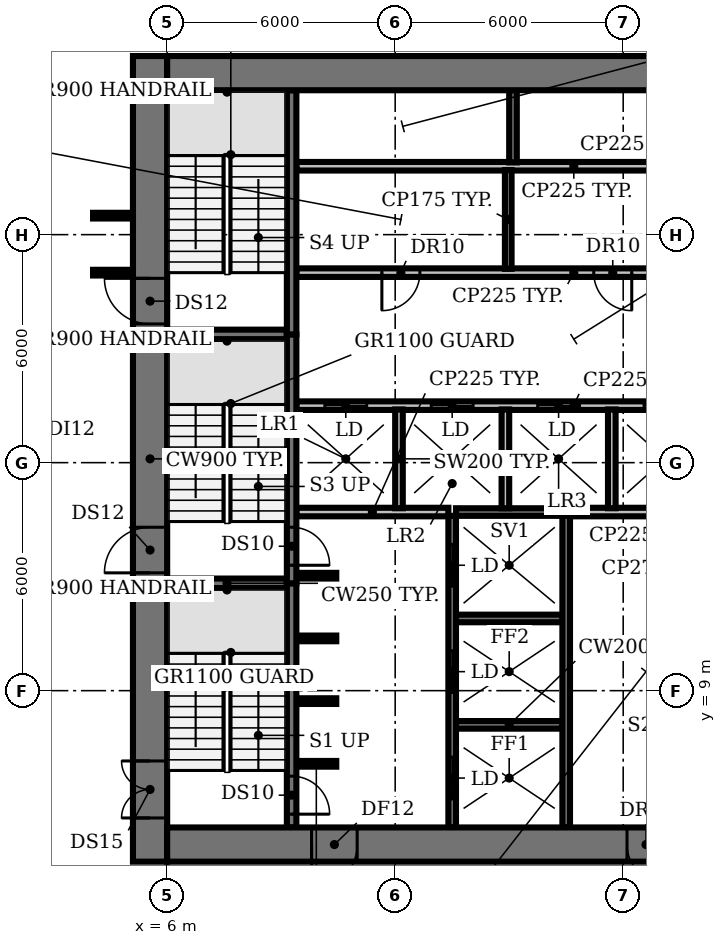
"""IFC4 building model, lengths in metres.
Left out: names, types, materials, properties, quantities, classifications, styles, units other than length and angle.
Written with IfcOpenShell. Run it as: python <this file> out.ifc"""

import sys

from ifc_helpers import new_model, si_unit, direction, frame, frame_2d, origin, place, context, subcontext, project, spatial, rectangle, extrude, element, fill, save


model = new_model("IFC4")
c1 = context("Model", 3, precision=1e-05, world=origin(), true_north=direction((0.0, 1.0)))
c2 = subcontext(c1, "Body", "Model", "MODEL_VIEW")
j1 = project(units=[si_unit("LENGTHUNIT", "METRE"), si_unit("PLANEANGLEUNIT", "RADIAN")], contexts=[c1])
p1 = place(None, origin())
s1 = spatial("IfcSite", under=j1, at=p1, CompositionType="ELEMENT")
p2 = place(p1, origin())
s2 = spatial("IfcBuilding", under=s1, at=p2, CompositionType="ELEMENT")
p3 = place(p2, frame((0.0, 0.0, 75.2)))
s3 = spatial("IfcBuildingStorey", under=s2, at=p3, CompositionType="ELEMENT", Elevation=75.2)
p4 = place(p3, frame((9.4, 7.075, 0.0), z_axis=(0.0, 0.0, 1.0), x_axis=(1.0, 0.0, 0.0)))
e1 = element("IfcWall", 1, at=p4, inside=s3, PredefinedType="SHEAR", context=c2, shape_type="SweptSolid", body=[
    extrude(rectangle(XDim=1.05, YDim=0.15, at=frame_2d((0.525, 0.0))), origin(), (0.0, 0.0, 1.0), 3.8),
])
p5 = place(p3, frame((13.6, 8.1, 0.0), z_axis=(0.0, 0.0, 1.0), x_axis=(1.0, 0.0, 0.0)))
e2 = element("IfcWall", 2, at=p5, inside=s3, PredefinedType="SHEAR", context=c2, shape_type="SweptSolid", body=[
    extrude(rectangle(XDim=2.8, YDim=0.2, at=frame_2d((1.4, 0.0))), origin(), (0.0, 0.0, 1.0), 3.8),
])
for number, where, z_axis, x_axis in (
    (3, (9.4, 8.725, 0.0), (0.0, 0.0, 1.0), (1.0, 0.0, 0.0)),
    (4, (9.4, 10.375, 0.0), (0.0, 0.0, 1.0), (1.0, 0.0, 0.0)),
):
    element("IfcWall", number, at=place(p3, frame(where, z_axis=z_axis, x_axis=x_axis)), inside=s3, PredefinedType="SHEAR", context=c2, shape_type="SweptSolid", body=[
        extrude(rectangle(XDim=1.05, YDim=0.15, at=frame_2d((0.525, 0.0))), origin(), (0.0, 0.0, 1.0), 3.8),
    ])
p6 = place(p3, frame((13.6, 10.9, 0.0), z_axis=(0.0, 0.0, 1.0), x_axis=(1.0, 0.0, 0.0)))
e5 = element("IfcWall", 5, at=p6, inside=s3, PredefinedType="SHEAR", context=c2, shape_type="SweptSolid", body=[
    extrude(rectangle(XDim=2.8, YDim=0.2, at=frame_2d((1.4, 0.0))), origin(), (0.0, 0.0, 1.0), 3.8),
])
p7 = place(p3, frame((6.0, 11.825, 0.0), z_axis=(0.0, 0.0, 1.0), x_axis=(1.0, 0.0, 0.0)))
e6 = element("IfcWall", 6, at=p7, inside=s3, PredefinedType="SHEAR", context=c2, shape_type="SweptSolid", body=[
    extrude(rectangle(XDim=3.15, YDim=0.25, at=frame_2d((1.575, 0.0))), origin(), (0.0, 0.0, 1.0), 3.8),
])
p8 = place(p3, frame((9.4, 12.025, 0.0), z_axis=(0.0, 0.0, 1.0), x_axis=(1.0, 0.0, 0.0)))
e7 = element("IfcWall", 7, at=p8, inside=s3, PredefinedType="SHEAR", context=c2, shape_type="SweptSolid", body=[
    extrude(rectangle(XDim=1.05, YDim=0.15, at=frame_2d((0.525, 0.0))), origin(), (0.0, 0.0, 1.0), 3.8),
])
p9 = place(p3, frame((9.4, 13.7, 0.0), z_axis=(0.0, 0.0, 1.0), x_axis=(1.0, 0.0, 0.0)))
e8 = element("IfcWall", 8, at=p9, inside=s3, PredefinedType="PARTITIONING", context=c2, shape_type="SweptSolid", body=[
    extrude(rectangle(XDim=4.0, YDim=0.225, at=frame_2d((2.0, 0.0))), origin(), (0.0, 0.0, 1.0), 3.8),
])
p10 = place(p3, frame((13.6, 13.7, 0.0), z_axis=(0.0, 0.0, 1.0), x_axis=(1.0, 0.0, 0.0)))
e9 = element("IfcWall", 9, at=p10, inside=s3, PredefinedType="SHEAR", context=c2, shape_type="SweptSolid", body=[
    extrude(rectangle(XDim=2.8, YDim=0.2, at=frame_2d((1.4, 0.0))), origin(), (0.0, 0.0, 1.0), 3.8),
])
p11 = place(p3, frame((16.6, 13.7, 0.0), z_axis=(0.0, 0.0, 1.0), x_axis=(1.0, 0.0, 0.0)))
e10 = element("IfcWall", 10, at=p11, inside=s3, PredefinedType="PARTITIONING", context=c2, shape_type="SweptSolid", body=[
    extrude(rectangle(XDim=7.4, YDim=0.225, at=frame_2d((3.7, 0.0))), origin(), (0.0, 0.0, 1.0), 3.8),
])
p12 = place(p3, frame((9.4, 16.5, 0.0), z_axis=(0.0, 0.0, 1.0), x_axis=(1.0, 0.0, 0.0)))
e11 = element("IfcWall", 11, at=p12, inside=s3, PredefinedType="PARTITIONING", context=c2, shape_type="SweptSolid", body=[
    extrude(rectangle(XDim=14.6, YDim=0.225, at=frame_2d((7.3, 0.0))), origin(), (0.0, 0.0, 1.0), 3.8),
])
p13 = place(p12, frame((0.75, 0.0, 0.0)))
e12 = element("IfcOpeningElement", 12, at=p13, cuts=e11, PredefinedType="OPENING", context=c2, shape_type="SweptSolid", body=[
    extrude(rectangle(XDim=1.1, YDim=2.1, at=frame_2d((0.55, 1.05))), frame((0.0, 0.123, 0.0), z_axis=(0.0, -1.0, 0.0), x_axis=(1.0, 0.0, 0.0)), (0.0, 0.0, 1.0), 0.245),
])
p14 = place(p12, frame((3.55, 0.0, 0.0)))
e13 = element("IfcOpeningElement", 13, at=p14, cuts=e11, PredefinedType="OPENING", context=c2, shape_type="SweptSolid", body=[
    extrude(rectangle(XDim=1.1, YDim=2.1, at=frame_2d((0.55, 1.05))), frame((0.0, 0.123, 0.0), z_axis=(0.0, -1.0, 0.0), x_axis=(1.0, 0.0, 0.0)), (0.0, 0.0, 1.0), 0.245),
])
p15 = place(p12, frame((6.35, 0.0, 0.0)))
e14 = element("IfcOpeningElement", 14, at=p15, cuts=e11, PredefinedType="OPENING", context=c2, shape_type="SweptSolid", body=[
    extrude(rectangle(XDim=1.1, YDim=2.1, at=frame_2d((0.55, 1.05))), frame((0.0, 0.123, 0.0), z_axis=(0.0, -1.0, 0.0), x_axis=(1.0, 0.0, 0.0)), (0.0, 0.0, 1.0), 0.245),
])
p16 = place(p12, frame((9.15, 0.0, 0.0)))
e15 = element("IfcOpeningElement", 15, at=p16, cuts=e11, PredefinedType="OPENING", context=c2, shape_type="SweptSolid", body=[
    extrude(rectangle(XDim=1.1, YDim=2.1, at=frame_2d((0.55, 1.05))), frame((0.0, 0.123, 0.0), z_axis=(0.0, -1.0, 0.0), x_axis=(1.0, 0.0, 0.0)), (0.0, 0.0, 1.0), 0.245),
])
p17 = place(p12, frame((11.308, 0.0, 0.0)))
e16 = element("IfcOpeningElement", 16, at=p17, cuts=e11, PredefinedType="OPENING", context=c2, shape_type="SweptSolid", body=[
    extrude(rectangle(XDim=0.9, YDim=2.1, at=frame_2d((0.45, 1.05))), frame((0.0, 0.123, 0.0), z_axis=(0.0, -1.0, 0.0), x_axis=(1.0, 0.0, 0.0)), (0.0, 0.0, 1.0), 0.245),
])
p18 = place(p12, frame((13.083, 0.0, 0.0)))
e17 = element("IfcOpeningElement", 17, at=p18, cuts=e11, PredefinedType="OPENING", context=c2, shape_type="SweptSolid", body=[
    extrude(rectangle(XDim=0.9, YDim=2.1, at=frame_2d((0.45, 1.05))), frame((0.0, 0.123, 0.0), z_axis=(0.0, -1.0, 0.0), x_axis=(1.0, 0.0, 0.0)), (0.0, 0.0, 1.0), 0.245),
])
p19 = place(p3, frame((6.0, 18.375, 0.0), z_axis=(0.0, 0.0, 1.0), x_axis=(1.0, 0.0, 0.0)))
e18 = element("IfcWall", 18, at=p19, inside=s3, PredefinedType="SHEAR", context=c2, shape_type="SweptSolid", body=[
    extrude(rectangle(XDim=3.15, YDim=0.25, at=frame_2d((1.575, 0.0))), origin(), (0.0, 0.0, 1.0), 3.8),
])
p20 = place(p3, frame((24.0, 20.0, 0.0), z_axis=(0.0, 0.0, 1.0), x_axis=(-1.0, 0.0, 0.0)))
e19 = element("IfcWall", 19, at=p20, inside=s3, PredefinedType="PARTITIONING", context=c2, shape_type="SweptSolid", body=[
    extrude(rectangle(XDim=14.6, YDim=0.225, at=frame_2d((7.3, 0.0))), origin(), (0.0, 0.0, 1.0), 3.8),
])
p21 = place(p20, frame((11.35, 0.0, 0.0)))
e20 = element("IfcOpeningElement", 20, at=p21, cuts=e19, PredefinedType="OPENING", context=c2, shape_type="SweptSolid", body=[
    extrude(rectangle(XDim=1.0, YDim=2.1, at=frame_2d((0.5, 1.05))), frame((0.0, 0.123, 0.0), z_axis=(0.0, -1.0, 0.0), x_axis=(1.0, 0.0, 0.0)), (0.0, 0.0, 1.0), 0.245),
])
p22 = place(p20, frame((5.775, 0.0, 0.0)))
e21 = element("IfcOpeningElement", 21, at=p22, cuts=e19, PredefinedType="OPENING", context=c2, shape_type="SweptSolid", body=[
    extrude(rectangle(XDim=1.0, YDim=2.1, at=frame_2d((0.5, 1.05))), frame((0.0, 0.123, 0.0), z_axis=(0.0, -1.0, 0.0), x_axis=(1.0, 0.0, 0.0)), (0.0, 0.0, 1.0), 0.245),
])
p23 = place(p20, frame((2.308, 0.0, 0.0)))
e22 = element("IfcOpeningElement", 22, at=p23, cuts=e19, PredefinedType="OPENING", context=c2, shape_type="SweptSolid", body=[
    extrude(rectangle(XDim=0.9, YDim=2.1, at=frame_2d((0.45, 1.05))), frame((0.0, 0.123, 0.0), z_axis=(0.0, -1.0, 0.0), x_axis=(1.0, 0.0, 0.0)), (0.0, 0.0, 1.0), 0.245),
])
p24 = place(p20, frame((0.532, 0.0, 0.0)))
e23 = element("IfcOpeningElement", 23, at=p24, cuts=e19, PredefinedType="OPENING", context=c2, shape_type="SweptSolid", body=[
    extrude(rectangle(XDim=0.9, YDim=2.1, at=frame_2d((0.45, 1.05))), frame((0.0, 0.123, 0.0), z_axis=(0.0, -1.0, 0.0), x_axis=(1.0, 0.0, 0.0)), (0.0, 0.0, 1.0), 0.245),
])
p25 = place(p3, frame((9.4, 22.8, 0.0), z_axis=(0.0, 0.0, 1.0), x_axis=(1.0, 0.0, 0.0)))
e24 = element("IfcWall", 24, at=p25, inside=s3, PredefinedType="PARTITIONING", context=c2, shape_type="SweptSolid", body=[
    extrude(rectangle(XDim=14.6, YDim=0.225, at=frame_2d((7.3, 0.0))), origin(), (0.0, 0.0, 1.0), 3.8),
])
p26 = place(p3, frame((9.275, 11.825, 0.0), z_axis=(0.0, 0.0, 1.0), x_axis=(0.0, -1.0, 0.0)))
e25 = element("IfcWall", 25, at=p26, inside=s3, PredefinedType="SHEAR", context=c2, shape_type="SweptSolid", body=[
    extrude(rectangle(XDim=6.425, YDim=0.25, at=frame_2d((3.212, 0.0))), origin(), (0.0, 0.0, 1.0), 3.8),
])
p27 = place(p26, frame((5.075, 0.0, 0.0)))
e26 = element("IfcOpeningElement", 26, at=p27, cuts=e25, PredefinedType="OPENING", context=c2, shape_type="SweptSolid", body=[
    extrude(rectangle(XDim=1.0, YDim=2.1, at=frame_2d((0.5, 1.05))), frame((0.0, 0.135, 0.0), z_axis=(0.0, -1.0, 0.0), x_axis=(1.0, 0.0, 0.0)), (0.0, 0.0, 1.0), 0.27),
])
p28 = place(p3, frame((9.275, 18.375, 0.0), z_axis=(0.0, 0.0, 1.0), x_axis=(0.0, -1.0, 0.0)))
e27 = element("IfcWall", 27, at=p28, inside=s3, PredefinedType="SHEAR", context=c2, shape_type="SweptSolid", body=[
    extrude(rectangle(XDim=6.55, YDim=0.25, at=frame_2d((3.275, 0.0))), origin(), (0.0, 0.0, 1.0), 3.8),
])
p29 = place(p28, frame((5.075, 0.0, 0.0)))
e28 = element("IfcOpeningElement", 28, at=p29, cuts=e27, PredefinedType="OPENING", context=c2, shape_type="SweptSolid", body=[
    extrude(rectangle(XDim=1.0, YDim=2.1, at=frame_2d((0.5, 1.05))), frame((0.0, 0.135, 0.0), z_axis=(0.0, -1.0, 0.0), x_axis=(1.0, 0.0, 0.0)), (0.0, 0.0, 1.0), 0.27),
])
p30 = place(p3, frame((9.275, 18.375, 0.0), z_axis=(0.0, 0.0, 1.0), x_axis=(0.0, 1.0, 0.0)))
e29 = element("IfcWall", 29, at=p30, inside=s3, PredefinedType="SHEAR", context=c2, shape_type="SweptSolid", body=[
    extrude(rectangle(XDim=6.425, YDim=0.25, at=frame_2d((3.212, 0.0))), origin(), (0.0, 0.0, 1.0), 3.8),
])
p31 = place(p3, frame((12.1, 13.8, 0.0), z_axis=(0.0, 0.0, 1.0), x_axis=(0.0, 1.0, 0.0)))
e30 = element("IfcWall", 30, at=p31, inside=s3, PredefinedType="SOLIDWALL", context=c2, shape_type="SweptSolid", body=[
    extrude(rectangle(XDim=2.6, YDim=0.2, at=frame_2d((1.3, 0.0))), origin(), (0.0, 0.0, 1.0), 3.8),
])
p32 = place(p3, frame((13.5, 5.4, 0.0), z_axis=(0.0, 0.0, 1.0), x_axis=(0.0, 1.0, 0.0)))
e31 = element("IfcWall", 31, at=p32, inside=s3, PredefinedType="SHEAR", context=c2, shape_type="SweptSolid", body=[
    extrude(rectangle(XDim=8.2, YDim=0.2, at=frame_2d((4.1, 0.0))), origin(), (0.0, 0.0, 1.0), 3.8),
])
p33 = place(p32, frame((0.75, 0.0, 0.0)))
e32 = element("IfcOpeningElement", 32, at=p33, cuts=e31, PredefinedType="OPENING", context=c2, shape_type="SweptSolid", body=[
    extrude(rectangle(XDim=1.1, YDim=2.1, at=frame_2d((0.55, 1.05))), frame((0.0, 0.11, 0.0), z_axis=(0.0, -1.0, 0.0), x_axis=(1.0, 0.0, 0.0)), (0.0, 0.0, 1.0), 0.22),
])
p34 = place(p32, frame((3.55, 0.0, 0.0)))
e33 = element("IfcOpeningElement", 33, at=p34, cuts=e31, PredefinedType="OPENING", context=c2, shape_type="SweptSolid", body=[
    extrude(rectangle(XDim=1.1, YDim=2.1, at=frame_2d((0.55, 1.05))), frame((0.0, 0.11, 0.0), z_axis=(0.0, -1.0, 0.0), x_axis=(1.0, 0.0, 0.0)), (0.0, 0.0, 1.0), 0.22),
])
p35 = place(p32, frame((6.35, 0.0, 0.0)))
e34 = element("IfcOpeningElement", 34, at=p35, cuts=e31, PredefinedType="OPENING", context=c2, shape_type="SweptSolid", body=[
    extrude(rectangle(XDim=1.1, YDim=2.1, at=frame_2d((0.55, 1.05))), frame((0.0, 0.11, 0.0), z_axis=(0.0, -1.0, 0.0), x_axis=(1.0, 0.0, 0.0)), (0.0, 0.0, 1.0), 0.22),
])
p36 = place(p3, frame((14.9, 13.8, 0.0), z_axis=(0.0, 0.0, 1.0), x_axis=(0.0, 1.0, 0.0)))
e35 = element("IfcWall", 35, at=p36, inside=s3, PredefinedType="SOLIDWALL", context=c2, shape_type="SweptSolid", body=[
    extrude(rectangle(XDim=2.6, YDim=0.2, at=frame_2d((1.3, 0.0))), origin(), (0.0, 0.0, 1.0), 3.8),
])
p37 = place(p3, frame((14.975, 20.1, 0.0), z_axis=(0.0, 0.0, 1.0), x_axis=(0.0, 1.0, 0.0)))
e36 = element("IfcWall", 36, at=p37, inside=s3, PredefinedType="PARTITIONING", context=c2, shape_type="SweptSolid", body=[
    extrude(rectangle(XDim=2.6, YDim=0.175, at=frame_2d((1.3, 0.0))), origin(), (0.0, 0.0, 1.0), 3.8),
])
p38 = place(p3, frame((15.1, 22.9, 0.0), z_axis=(0.0, 0.0, 1.0), x_axis=(0.0, 1.0, 0.0)))
e37 = element("IfcWall", 37, at=p38, inside=s3, PredefinedType="SHEAR", context=c2, shape_type="SweptSolid", body=[
    extrude(rectangle(XDim=1.9, YDim=0.2, at=frame_2d((0.95, 0.0))), origin(), (0.0, 0.0, 1.0), 3.8),
])
p39 = place(p3, frame((16.5, 5.4, 0.0), z_axis=(0.0, 0.0, 1.0), x_axis=(0.0, 1.0, 0.0)))
e38 = element("IfcWall", 38, at=p39, inside=s3, PredefinedType="SHEAR", context=c2, shape_type="SweptSolid", body=[
    extrude(rectangle(XDim=8.2, YDim=0.2, at=frame_2d((4.1, 0.0))), origin(), (0.0, 0.0, 1.0), 3.8),
])
p40 = place(p3, frame((17.7, 13.8, 0.0), z_axis=(0.0, 0.0, 1.0), x_axis=(0.0, 1.0, 0.0)))
e39 = element("IfcWall", 39, at=p40, inside=s3, PredefinedType="SOLIDWALL", context=c2, shape_type="SweptSolid", body=[
    extrude(rectangle(XDim=2.6, YDim=0.2, at=frame_2d((1.3, 0.0))), origin(), (0.0, 0.0, 1.0), 3.8),
])
p41 = place(p3, frame((5.55, 4.5, 0.0), z_axis=(0.0, 0.0, 1.0), x_axis=(0.0, 1.0, 0.0)))
e40 = element("IfcWall", 40, at=p41, inside=s3, PredefinedType="SHEAR", context=c2, shape_type="SweptSolid", body=[
    extrude(rectangle(XDim=21.2, YDim=0.9, at=frame_2d((10.6, 0.0))), origin(), (0.0, 0.0, 1.0), 3.8),
])
p42 = place(p41, frame((1.15, 0.0, 0.0)))
e41 = element("IfcOpeningElement", 41, at=p42, cuts=e40, PredefinedType="OPENING", context=c2, shape_type="SweptSolid", body=[
    extrude(rectangle(XDim=1.5, YDim=2.1, at=frame_2d((0.75, 1.05))), frame((0.0, 0.46, 0.0), z_axis=(0.0, -1.0, 0.0), x_axis=(1.0, 0.0, 0.0)), (0.0, 0.0, 1.0), 0.92),
])
p43 = place(p41, frame((7.6, 0.0, 0.0)))
e42 = element("IfcOpeningElement", 42, at=p43, cuts=e40, PredefinedType="OPENING", context=c2, shape_type="SweptSolid", body=[
    extrude(rectangle(XDim=1.2, YDim=2.1, at=frame_2d((0.6, 1.05))), frame((0.0, 0.46, 0.0), z_axis=(0.0, -1.0, 0.0), x_axis=(1.0, 0.0, 0.0)), (0.0, 0.0, 1.0), 0.92),
])
p44 = place(p41, frame((14.15, 0.0, 0.0)))
e43 = element("IfcOpeningElement", 43, at=p44, cuts=e40, PredefinedType="OPENING", context=c2, shape_type="SweptSolid", body=[
    extrude(rectangle(XDim=1.2, YDim=2.1, at=frame_2d((0.6, 1.05))), frame((0.0, 0.46, 0.0), z_axis=(0.0, -1.0, 0.0), x_axis=(1.0, 0.0, 0.0)), (0.0, 0.0, 1.0), 0.92),
])
p45 = place(p3, frame((24.0, 4.95, 0.0), z_axis=(0.0, 0.0, 1.0), x_axis=(-1.0, 0.0, 0.0)))
e44 = element("IfcWall", 44, at=p45, inside=s3, PredefinedType="SHEAR", context=c2, shape_type="SweptSolid", body=[
    extrude(rectangle(XDim=18.0, YDim=0.9, at=frame_2d((9.0, 0.0))), origin(), (0.0, 0.0, 1.0), 3.8),
])
p46 = place(p45, frame((13.0, 0.0, 0.0)))
e45 = element("IfcOpeningElement", 45, at=p46, cuts=e44, PredefinedType="OPENING", context=c2, shape_type="SweptSolid", body=[
    extrude(rectangle(XDim=1.2, YDim=2.1, at=frame_2d((0.6, 1.05))), frame((0.0, 0.46, 0.0), z_axis=(0.0, -1.0, 0.0), x_axis=(1.0, 0.0, 0.0)), (0.0, 0.0, 1.0), 0.92),
])
p47 = place(p45, frame((4.9, 0.0, 0.0)))
e46 = element("IfcOpeningElement", 46, at=p47, cuts=e44, PredefinedType="OPENING", context=c2, shape_type="SweptSolid", body=[
    extrude(rectangle(XDim=1.0, YDim=2.1, at=frame_2d((0.5, 1.05))), frame((0.0, 0.46, 0.0), z_axis=(0.0, -1.0, 0.0), x_axis=(1.0, 0.0, 0.0)), (0.0, 0.0, 1.0), 0.92),
])
p48 = place(p3, frame((6.0, 25.25, 0.0), z_axis=(0.0, 0.0, 1.0), x_axis=(1.0, 0.0, 0.0)))
e47 = element("IfcWall", 47, at=p48, inside=s3, PredefinedType="SHEAR", context=c2, shape_type="SweptSolid", body=[
    extrude(rectangle(XDim=18.0, YDim=0.9, at=frame_2d((9.0, 0.0))), origin(), (0.0, 0.0, 1.0), 3.8),
])
for number, where, z_axis, x_axis in (
    (48, (4.05, 20.0, 0.0), (0.0, 0.0, 1.0), (1.0, 0.0, 0.0)),
    (49, (4.05, 21.5, 0.0), (0.0, 0.0, 1.0), (1.0, 0.0, 0.0)),
):
    element("IfcWall", number, at=place(p3, frame(where, z_axis=z_axis, x_axis=x_axis)), inside=s3, PredefinedType="PARTITIONING", context=c2, shape_type="SweptSolid", body=[
        extrude(rectangle(XDim=1.05, YDim=0.15, at=frame_2d((0.525, 0.0))), origin(), (0.0, 0.0, 1.0), 2.78),
    ])
p49 = place(p13, origin())
e50 = element("IfcDoor", 50, at=p49, inside=s3, OperationType="DOUBLE_DOOR_SLIDING", PredefinedType="DOOR", context=c2, shape_type="SweptSolid", body=[
    extrude(rectangle(XDim=1.1, YDim=2.1, at=frame_2d((0.55, 1.05))), frame((0.0, 0.025, 0.0), z_axis=(0.0, -1.0, 0.0), x_axis=(1.0, 0.0, 0.0)), (0.0, 0.0, 1.0), 0.05),
])
fill(e12, e50)
p50 = place(p14, origin())
e51 = element("IfcDoor", 51, at=p50, inside=s3, OperationType="DOUBLE_DOOR_SLIDING", PredefinedType="DOOR", context=c2, shape_type="SweptSolid", body=[
    extrude(rectangle(XDim=1.1, YDim=2.1, at=frame_2d((0.55, 1.05))), frame((0.0, 0.025, 0.0), z_axis=(0.0, -1.0, 0.0), x_axis=(1.0, 0.0, 0.0)), (0.0, 0.0, 1.0), 0.05),
])
fill(e13, e51)
p51 = place(p15, origin())
e52 = element("IfcDoor", 52, at=p51, inside=s3, OperationType="DOUBLE_DOOR_SLIDING", PredefinedType="DOOR", context=c2, shape_type="SweptSolid", body=[
    extrude(rectangle(XDim=1.1, YDim=2.1, at=frame_2d((0.55, 1.05))), frame((0.0, 0.025, 0.0), z_axis=(0.0, -1.0, 0.0), x_axis=(1.0, 0.0, 0.0)), (0.0, 0.0, 1.0), 0.05),
])
fill(e14, e52)
p52 = place(p16, origin())
e53 = element("IfcDoor", 53, at=p52, inside=s3, OperationType="DOUBLE_DOOR_SLIDING", PredefinedType="DOOR", context=c2, shape_type="SweptSolid", body=[
    extrude(rectangle(XDim=1.1, YDim=2.1, at=frame_2d((0.55, 1.05))), frame((0.0, 0.025, 0.0), z_axis=(0.0, -1.0, 0.0), x_axis=(1.0, 0.0, 0.0)), (0.0, 0.0, 1.0), 0.05),
])
fill(e15, e53)
p53 = place(p21, origin())
e54 = element("IfcDoor", 54, at=p53, inside=s3, OperationType="SINGLE_SWING_RIGHT", PredefinedType="DOOR", context=c2, shape_type="SweptSolid", body=[
    extrude(rectangle(XDim=1.0, YDim=2.1, at=frame_2d((0.5, 1.05))), frame((0.0, 0.025, 0.0), z_axis=(0.0, -1.0, 0.0), x_axis=(1.0, 0.0, 0.0)), (0.0, 0.0, 1.0), 0.05),
])
fill(e20, e54)
p54 = place(p22, origin())
e55 = element("IfcDoor", 55, at=p54, inside=s3, OperationType="SINGLE_SWING_LEFT", PredefinedType="DOOR", context=c2, shape_type="SweptSolid", body=[
    extrude(rectangle(XDim=1.0, YDim=2.1, at=frame_2d((0.5, 1.05))), frame((0.0, 0.025, 0.0), z_axis=(0.0, -1.0, 0.0), x_axis=(1.0, 0.0, 0.0)), (0.0, 0.0, 1.0), 0.05),
])
fill(e21, e55)
p55 = place(p27, origin())
e56 = element("IfcDoor", 56, at=p55, inside=s3, OperationType="SINGLE_SWING_RIGHT", PredefinedType="DOOR", context=c2, shape_type="SweptSolid", body=[
    extrude(rectangle(XDim=1.0, YDim=2.1, at=frame_2d((0.5, 1.05))), frame((0.0, 0.025, 0.0), z_axis=(0.0, -1.0, 0.0), x_axis=(1.0, 0.0, 0.0)), (0.0, 0.0, 1.0), 0.05),
])
fill(e26, e56)
p56 = place(p29, origin())
e57 = element("IfcDoor", 57, at=p56, inside=s3, OperationType="SINGLE_SWING_RIGHT", PredefinedType="DOOR", context=c2, shape_type="SweptSolid", body=[
    extrude(rectangle(XDim=1.0, YDim=2.1, at=frame_2d((0.5, 1.05))), frame((0.0, 0.025, 0.0), z_axis=(0.0, -1.0, 0.0), x_axis=(1.0, 0.0, 0.0)), (0.0, 0.0, 1.0), 0.05),
])
fill(e28, e57)
p57 = place(p33, origin())
e58 = element("IfcDoor", 58, at=p57, inside=s3, OperationType="DOUBLE_DOOR_SLIDING", PredefinedType="DOOR", context=c2, shape_type="SweptSolid", body=[
    extrude(rectangle(XDim=1.1, YDim=2.1, at=frame_2d((0.55, 1.05))), frame((0.0, 0.025, 0.0), z_axis=(0.0, -1.0, 0.0), x_axis=(1.0, 0.0, 0.0)), (0.0, 0.0, 1.0), 0.05),
])
fill(e32, e58)
p58 = place(p34, origin())
e59 = element("IfcDoor", 59, at=p58, inside=s3, OperationType="DOUBLE_DOOR_SLIDING", PredefinedType="DOOR", context=c2, shape_type="SweptSolid", body=[
    extrude(rectangle(XDim=1.1, YDim=2.1, at=frame_2d((0.55, 1.05))), frame((0.0, 0.025, 0.0), z_axis=(0.0, -1.0, 0.0), x_axis=(1.0, 0.0, 0.0)), (0.0, 0.0, 1.0), 0.05),
])
fill(e33, e59)
p59 = place(p35, origin())
e60 = element("IfcDoor", 60, at=p59, inside=s3, OperationType="DOUBLE_DOOR_SLIDING", PredefinedType="DOOR", context=c2, shape_type="SweptSolid", body=[
    extrude(rectangle(XDim=1.1, YDim=2.1, at=frame_2d((0.55, 1.05))), frame((0.0, 0.025, 0.0), z_axis=(0.0, -1.0, 0.0), x_axis=(1.0, 0.0, 0.0)), (0.0, 0.0, 1.0), 0.05),
])
fill(e34, e60)
p60 = place(p42, origin())
e61 = element("IfcDoor", 61, at=p60, inside=s3, OperationType="DOUBLE_DOOR_SINGLE_SWING", PredefinedType="DOOR", context=c2, shape_type="SweptSolid", body=[
    extrude(rectangle(XDim=1.5, YDim=2.1, at=frame_2d((0.75, 1.05))), frame((0.0, 0.025, 0.0), z_axis=(0.0, -1.0, 0.0), x_axis=(1.0, 0.0, 0.0)), (0.0, 0.0, 1.0), 0.05),
])
fill(e41, e61)
p61 = place(p43, origin())
e62 = element("IfcDoor", 62, at=p61, inside=s3, OperationType="SINGLE_SWING_LEFT", PredefinedType="DOOR", context=c2, shape_type="SweptSolid", body=[
    extrude(rectangle(XDim=1.2, YDim=2.1, at=frame_2d((0.6, 1.05))), frame((0.0, 0.025, 0.0), z_axis=(0.0, -1.0, 0.0), x_axis=(1.0, 0.0, 0.0)), (0.0, 0.0, 1.0), 0.05),
])
fill(e42, e62)
p62 = place(p44, origin())
e63 = element("IfcDoor", 63, at=p62, inside=s3, OperationType="SINGLE_SWING_RIGHT", PredefinedType="DOOR", context=c2, shape_type="SweptSolid", body=[
    extrude(rectangle(XDim=1.2, YDim=2.1, at=frame_2d((0.6, 1.05))), frame((0.0, 0.025, 0.0), z_axis=(0.0, -1.0, 0.0), x_axis=(1.0, 0.0, 0.0)), (0.0, 0.0, 1.0), 0.05),
])
fill(e43, e63)
p63 = place(p46, origin())
e64 = element("IfcDoor", 64, at=p63, inside=s3, OperationType="SINGLE_SWING_RIGHT", PredefinedType="DOOR", context=c2, shape_type="SweptSolid", body=[
    extrude(rectangle(XDim=1.2, YDim=2.1, at=frame_2d((0.6, 1.05))), frame((0.0, 0.025, 0.0), z_axis=(0.0, -1.0, 0.0), x_axis=(1.0, 0.0, 0.0)), (0.0, 0.0, 1.0), 0.05),
])
fill(e45, e64)
p64 = place(p47, origin())
e65 = element("IfcDoor", 65, at=p64, inside=s3, OperationType="SINGLE_SWING_LEFT", PredefinedType="DOOR", context=c2, shape_type="SweptSolid", body=[
    extrude(rectangle(XDim=1.0, YDim=2.1, at=frame_2d((0.5, 1.05))), frame((0.0, -0.39, 0.0), z_axis=(0.0, -1.0, 0.0), x_axis=(1.0, 0.0, 0.0)), (0.0, 0.0, 1.0), 0.05),
])
fill(e46, e65)
save(model, sys.argv[1])
